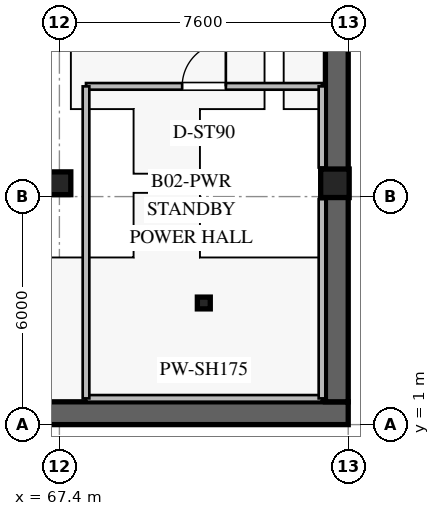
"""IFC4 building model, lengths in metres.
Left out: names, types, materials, properties, quantities, classifications, styles, units other than length and angle.
Written with IfcOpenShell. Run it as: python <this file> out.ifc"""

import sys

from ifc_helpers import new_model, si_unit, direction, frame, frame_2d, origin, origin_2d, place, context, subcontext, project, spatial, rectangle, i_section, extrude, element, fill, save


model = new_model("IFC4")
c1 = context("Model", 3, precision=1e-05, world=origin(), true_north=direction((0.0, 1.0)))
c2 = subcontext(c1, "Body", "Model", "MODEL_VIEW")
j1 = project(units=[si_unit("LENGTHUNIT", "METRE"), si_unit("PLANEANGLEUNIT", "RADIAN")], contexts=[c1])
p1 = place(None, origin())
s1 = spatial("IfcSite", under=j1, at=p1, CompositionType="ELEMENT")
p2 = place(p1, origin())
s2 = spatial("IfcBuilding", under=s1, at=p2, CompositionType="ELEMENT")
p3 = place(p2, frame((0.0, 0.0, -8.4)))
s3 = spatial("IfcBuildingStorey", under=s2, at=p3, CompositionType="ELEMENT", Elevation=-8.4)
p4 = place(p3, frame((1.0, 1.3, 0.0), z_axis=(0.0, 0.0, 1.0), x_axis=(1.0, 0.0, 0.0)))
e1 = element("IfcWall", 1, at=p4, inside=s3, PredefinedType="USERDEFINED", context=c2, shape_type="SweptSolid", body=[
    extrude(rectangle(XDim=74.0, YDim=0.6, at=frame_2d((37.0, 0.0))), origin(), (0.0, 0.0, 1.0), 3.88),
])
p5 = place(p3, frame((74.7, 1.6, 0.0), z_axis=(0.0, 0.0, 1.0), x_axis=(0.0, 1.0, 0.0)))
e2 = element("IfcWall", 2, at=p5, inside=s3, PredefinedType="USERDEFINED", context=c2, shape_type="SweptSolid", body=[
    extrude(rectangle(XDim=46.8, YDim=0.6, at=frame_2d((23.4, 0.0))), origin(), (0.0, 0.0, 1.0), 3.88),
])
p6 = place(p3, frame((71.2, 4.2, 0.0), z_axis=(0.0, 0.0, 1.0), x_axis=(1.0, 0.0, 0.0)))
e3 = element("IfcColumn", 3, at=p6, inside=s3, PredefinedType="COLUMN", context=c2, shape_type="SweptSolid", body=[
    extrude(i_section(OverallWidth=0.31, OverallDepth=0.34, WebThickness=0.021, FlangeThickness=0.039, at=origin_2d()), origin(), (0.0, 0.0, 1.0), 4.2),
])
p7 = place(p3, frame((67.4, 7.35, 0.0), z_axis=(0.0, 0.0, 1.0), x_axis=(1.0, 0.0, 0.0)))
e4 = element("IfcColumn", 4, at=p7, inside=s3, PredefinedType="COLUMN", context=c2, shape_type="SweptSolid", body=[
    extrude(rectangle(XDim=0.6, YDim=0.6, at=origin_2d()), origin(), (0.0, 0.0, 1.0), 4.2),
])
p8 = place(p3, frame((74.65, 7.35, 0.0), z_axis=(0.0, 0.0, 1.0), x_axis=(1.0, 0.0, 0.0)))
e5 = element("IfcColumn", 5, at=p8, inside=s3, PredefinedType="COLUMN", context=c2, shape_type="SweptSolid", body=[
    extrude(rectangle(XDim=0.75, YDim=0.75, at=origin_2d()), origin(), (0.0, 0.0, 1.0), 4.2),
])
p9 = place(p3, frame((68.1, 9.9, 0.0), z_axis=(0.0, 0.0, 1.0), x_axis=(1.0, 0.0, 0.0)))
e6 = element("IfcWall", 6, at=p9, inside=s3, PredefinedType="PARTITIONING", context=c2, shape_type="SweptSolid", body=[
    extrude(rectangle(XDim=6.21, YDim=0.175, at=frame_2d((3.105, 0.0))), origin(), (0.0, 0.0, 1.0), 3.58),
])
p10 = place(p9, frame((2.53, 0.0, 0.0)))
e7 = element("IfcOpeningElement", 7, at=p10, cuts=e6, PredefinedType="OPENING", context=c2, shape_type="SweptSolid", body=[
    extrude(rectangle(XDim=1.15, YDim=2.2, at=frame_2d((0.575, 1.1))), frame((0.0, 0.098, 0.0), z_axis=(0.0, -1.0, 0.0), x_axis=(1.0, 0.0, 0.0)), (0.0, 0.0, 1.0), 0.195),
])
p11 = place(p3, frame((68.1, 1.69, 0.0), z_axis=(0.0, 0.0, 1.0), x_axis=(1.0, 0.0, 0.0)))
e8 = element("IfcWall", 8, at=p11, inside=s3, PredefinedType="PARTITIONING", context=c2, shape_type="SweptSolid", body=[
    extrude(rectangle(XDim=6.21, YDim=0.175, at=frame_2d((3.105, 0.0))), origin(), (0.0, 0.0, 1.0), 3.88),
])
p12 = place(p3, frame((68.1, 1.69, 0.0), z_axis=(0.0, 0.0, 1.0), x_axis=(0.0, 1.0, 0.0)))
e9 = element("IfcWall", 9, at=p12, inside=s3, PredefinedType="PARTITIONING", context=c2, shape_type="SweptSolid", body=[
    extrude(rectangle(XDim=8.21, YDim=0.175, at=frame_2d((4.105, 0.0))), origin(), (0.0, 0.0, 1.0), 3.52),
])
p13 = place(p3, frame((74.31, 1.69, 0.0), z_axis=(0.0, 0.0, 1.0), x_axis=(0.0, 1.0, 0.0)))
e10 = element("IfcWall", 10, at=p13, inside=s3, PredefinedType="PARTITIONING", context=c2, shape_type="SweptSolid", body=[
    extrude(rectangle(XDim=5.245, YDim=0.175, at=frame_2d((2.623, 0.0))), origin(), (0.0, 0.0, 1.0), 3.88),
])
p14 = place(p3, frame((74.31, 7.765, 0.0), z_axis=(0.0, 0.0, 1.0), x_axis=(0.0, 1.0, 0.0)))
e11 = element("IfcWall", 11, at=p14, inside=s3, PredefinedType="PARTITIONING", context=c2, shape_type="SweptSolid", body=[
    extrude(rectangle(XDim=2.135, YDim=0.175, at=frame_2d((1.067, 0.0))), origin(), (0.0, 0.0, 1.0), 3.88),
])
p15 = place(p10, origin())
e12 = element("IfcDoor", 12, at=p15, inside=s3, OperationType="SINGLE_SWING_RIGHT", PredefinedType="DOOR", context=c2, shape_type="SweptSolid", body=[
    extrude(rectangle(XDim=1.15, YDim=2.2, at=frame_2d((0.575, 1.1))), frame((0.0, 0.025, 0.0), z_axis=(0.0, -1.0, 0.0), x_axis=(1.0, 0.0, 0.0)), (0.0, 0.0, 1.0), 0.05),
])
fill(e7, e12)
save(model, sys.argv[1])
